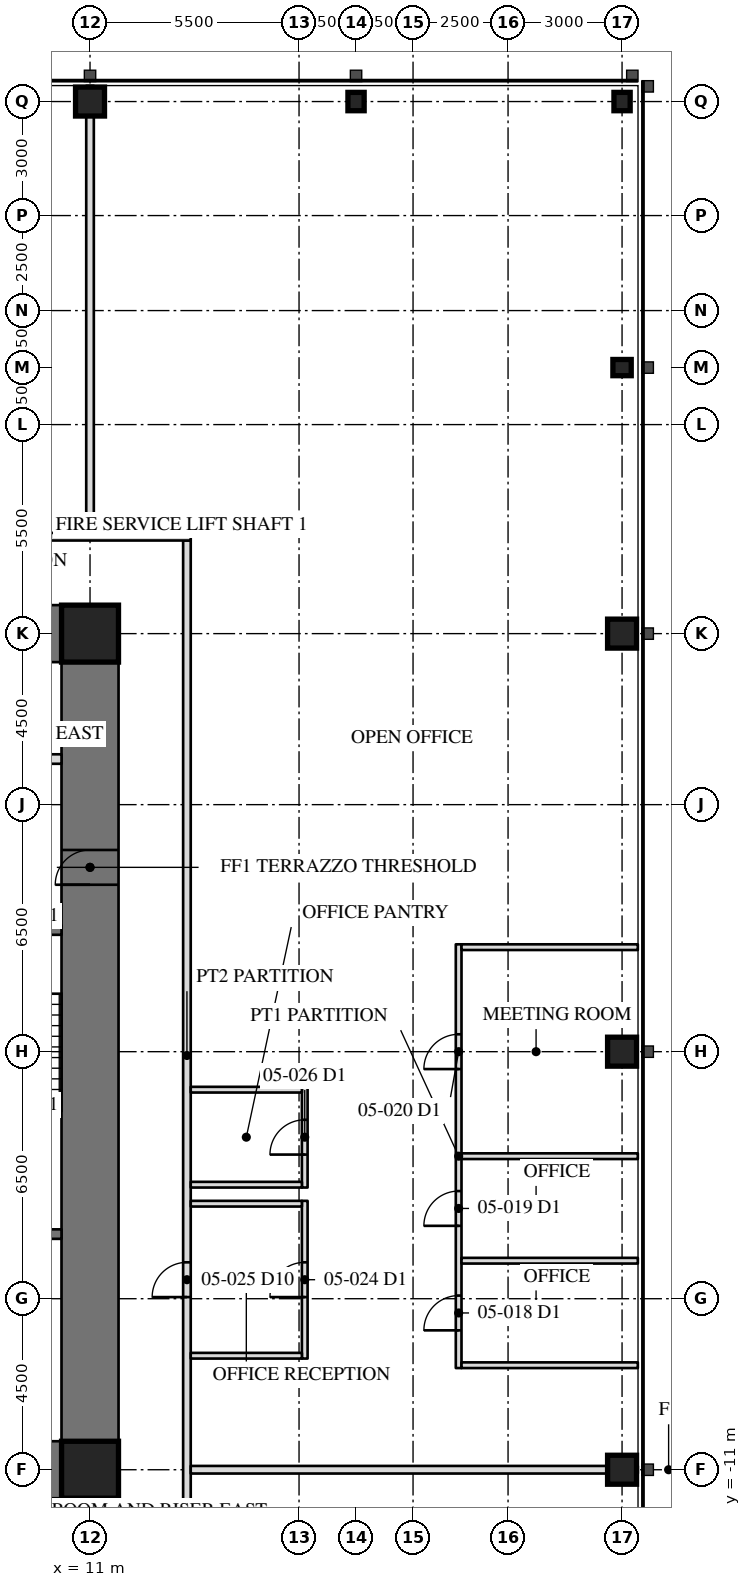
"""IFC4 building model, lengths in metres.
Left out: names, types, materials, properties, quantities, classifications, styles, units other than length and angle.
Written with IfcOpenShell. Run it as: python <this file> out.ifc"""

import sys

from ifc_helpers import new_model, si_unit, direction, frame, frame_2d, origin, origin_2d, place, context, subcontext, project, spatial, rectangle, hollow_rectangle, i_section, extrude, element, fill, save


model = new_model("IFC4")
c1 = context("Model", 3, precision=1e-05, world=origin(), true_north=direction((0.0, 1.0)))
c2 = subcontext(c1, "Body", "Model", "MODEL_VIEW")
j1 = project(units=[si_unit("LENGTHUNIT", "METRE"), si_unit("PLANEANGLEUNIT", "RADIAN")], contexts=[c1])
p1 = place(None, origin())
s1 = spatial("IfcSite", under=j1, at=p1, CompositionType="ELEMENT")
p2 = place(p1, origin())
s2 = spatial("IfcBuilding", under=s1, at=p2, CompositionType="ELEMENT")
p3 = place(p2, frame((0.0, 0.0, 24.2)))
s3 = spatial("IfcBuildingStorey", under=s2, at=p3, CompositionType="ELEMENT", Elevation=24.2)
for number, where, z_axis, x_axis in (
    (1, (25.0, -11.0, 0.0), (0.0, 0.0, 1.0), (0.0, 1.0, 0.0)),
    (2, (25.0, 0.0, 0.0), (0.0, 0.0, 1.0), (0.0, 1.0, 0.0)),
    (3, (25.0, 11.0, 0.0), (0.0, 0.0, 1.0), (0.0, 1.0, 0.0)),
):
    element("IfcColumn", number, at=place(p3, frame(where, z_axis=z_axis, x_axis=x_axis)), inside=s3, PredefinedType="COLUMN", context=c2, shape_type="SweptSolid", body=[
        extrude(hollow_rectangle(XDim=0.762, YDim=0.762, WallThickness=0.127, at=origin_2d()), origin(), (0.0, 0.0, 1.0), 4.1),
    ])
for number, where, z_axis, x_axis in (
    (4, (25.0, 18.0, 0.0), (0.0, 0.0, 1.0), (0.0, 1.0, 0.0)),
    (5, (25.0, 25.0, 0.0), (0.0, 0.0, 1.0), (1.0, 0.0, 0.0)),
    (6, (18.0, 25.0, 0.0), (0.0, 0.0, 1.0), (1.0, 0.0, 0.0)),
):
    element("IfcColumn", number, at=place(p3, frame(where, z_axis=z_axis, x_axis=x_axis)), inside=s3, PredefinedType="COLUMN", context=c2, shape_type="SweptSolid", body=[
        extrude(i_section(OverallWidth=0.427, OverallDepth=0.483, WebThickness=0.051, FlangeThickness=0.082, at=origin_2d()), origin(), (0.0, 0.0, 1.0), 4.1),
    ])
p4 = place(p3, frame((11.0, 25.0, 0.0), z_axis=(0.0, 0.0, 1.0), x_axis=(1.0, 0.0, 0.0)))
e7 = element("IfcColumn", 7, at=p4, inside=s3, PredefinedType="COLUMN", context=c2, shape_type="SweptSolid", body=[
    extrude(hollow_rectangle(XDim=0.762, YDim=0.762, WallThickness=0.127, at=origin_2d()), origin(), (0.0, 0.0, 1.0), 4.1),
])
p5 = place(p3, frame((11.0, -11.0, 0.0), z_axis=(0.0, 0.0, 1.0), x_axis=(0.0, 1.0, 0.0)))
e8 = element("IfcWall", 8, at=p5, inside=s3, PredefinedType="SHEAR", context=c2, shape_type="SweptSolid", body=[
    extrude(rectangle(XDim=22.0, YDim=1.5, at=frame_2d((11.0, 0.0))), origin(), (0.0, 0.0, 1.0), 4.1),
])
p6 = place(p5, frame((15.393, 0.0, 0.0)))
e9 = element("IfcOpeningElement", 9, at=p6, cuts=e8, PredefinedType="OPENING", context=c2, shape_type="SweptSolid", body=[
    extrude(rectangle(XDim=0.915, YDim=2.134, at=frame_2d((0.458, 1.067))), frame((0.0, 0.76, 0.0), z_axis=(0.0, -1.0, 0.0), x_axis=(1.0, 0.0, 0.0)), (0.0, 0.0, 1.0), 1.52),
])
for number, where, z_axis, x_axis in (
    (10, (11.0, 11.0, 0.0), (0.0, 0.0, 1.0), (-1.0, 0.0, 0.0)),
    (11, (6.5, -11.0, 0.0), (0.0, 0.0, 1.0), (1.0, 0.0, 0.0)),
):
    element("IfcWall", number, at=place(p3, frame(where, z_axis=z_axis, x_axis=x_axis)), inside=s3, PredefinedType="SHEAR", context=c2, shape_type="SweptSolid", body=[
        extrude(rectangle(XDim=4.5, YDim=1.5, at=frame_2d((2.25, 0.0))), origin(), (0.0, 0.0, 1.0), 4.1),
    ])
for number, where, z_axis, x_axis in (
    (12, (11.0, 11.0, 0.0), (0.0, 0.0, 1.0), (1.0, 0.0, 0.0)),
    (13, (11.0, -11.0, 0.0), (0.0, 0.0, 1.0), (1.0, 0.0, 0.0)),
):
    element("IfcColumn", number, at=place(p3, frame(where, z_axis=z_axis, x_axis=x_axis)), inside=s3, PredefinedType="COLUMN", context=c2, shape_type="SweptSolid", body=[
        extrude(hollow_rectangle(XDim=1.499, YDim=1.499, WallThickness=0.102, at=origin_2d()), origin(), (0.0, 0.0, 1.0), 4.1),
    ])
p7 = place(p3, frame((6.95, -4.8, 0.0), z_axis=(0.0, 0.0, 1.0), x_axis=(1.0, 0.0, 0.0)))
e14 = element("IfcWall", 14, at=p7, inside=s3, PredefinedType="SOLIDWALL", context=c2, shape_type="SweptSolid", body=[
    extrude(rectangle(XDim=3.3, YDim=0.25, at=frame_2d((1.65, 0.0))), origin(), (0.0, 0.0, 1.0), 3.91),
])
p8 = place(p3, frame((6.95, 3.2, 0.0), z_axis=(0.0, 0.0, 1.0), x_axis=(1.0, 0.0, 0.0)))
e15 = element("IfcWall", 15, at=p8, inside=s3, PredefinedType="SOLIDWALL", context=c2, shape_type="SweptSolid", body=[
    extrude(rectangle(XDim=3.3, YDim=0.25, at=frame_2d((1.65, 0.0))), origin(), (0.0, 0.0, 1.0), 3.91),
])
p9 = place(p8, frame((1.116, 0.0, 0.0)))
e16 = element("IfcOpeningElement", 16, at=p9, cuts=e15, PredefinedType="OPENING", context=c2, shape_type="SweptSolid", body=[
    extrude(rectangle(XDim=1.067, YDim=2.134, at=frame_2d((0.533, 1.067))), frame((0.0, 0.135, 0.0), z_axis=(0.0, -1.0, 0.0), x_axis=(1.0, 0.0, 0.0)), (0.0, 0.0, 1.0), 0.27),
])
p10 = place(p3, frame((6.95, 7.7, 0.0), z_axis=(0.0, 0.0, 1.0), x_axis=(1.0, 0.0, 0.0)))
e17 = element("IfcWall", 17, at=p10, inside=s3, PredefinedType="PARTITIONING", context=c2, shape_type="SweptSolid", body=[
    extrude(rectangle(XDim=3.3, YDim=0.25, at=frame_2d((1.65, 0.0))), origin(), (0.0, 0.0, 1.0), 3.91),
])
p11 = place(p10, frame((0.45, 0.0, 0.0)))
e18 = element("IfcOpeningElement", 18, at=p11, cuts=e17, PredefinedType="OPENING", context=c2, shape_type="SweptSolid", body=[
    extrude(rectangle(XDim=1.219, YDim=2.134, at=frame_2d((0.609, 1.067))), frame((0.0, 0.135, 0.0), z_axis=(0.0, -1.0, 0.0), x_axis=(1.0, 0.0, 0.0)), (0.0, 0.0, 1.0), 0.27),
])
p12 = place(p3, frame((13.55, -13.65, 0.0), z_axis=(0.0, 0.0, 1.0), x_axis=(0.0, 1.0, 0.0)))
e19 = element("IfcWall", 19, at=p12, inside=s3, PredefinedType="PARTITIONING", context=c2, shape_type="SweptSolid", body=[
    extrude(rectangle(XDim=27.1, YDim=0.2, at=frame_2d((13.55, 0.0))), origin(), (0.0, 0.0, 1.0), 3.91),
])
p13 = place(p12, frame((7.192, 0.0, 0.0)))
e20 = element("IfcOpeningElement", 20, at=p13, cuts=e19, PredefinedType="OPENING", context=c2, shape_type="SweptSolid", body=[
    extrude(rectangle(XDim=0.915, YDim=2.134, at=frame_2d((0.458, 1.067))), frame((0.0, 0.11, 0.0), z_axis=(0.0, -1.0, 0.0), x_axis=(1.0, 0.0, 0.0)), (0.0, 0.0, 1.0), 0.22),
])
p14 = place(p3, frame((13.65, 13.55, 0.0), z_axis=(0.0, 0.0, 1.0), x_axis=(-1.0, 0.0, 0.0)))
e21 = element("IfcWall", 21, at=p14, inside=s3, PredefinedType="PARTITIONING", context=c2, shape_type="SweptSolid", body=[
    extrude(rectangle(XDim=27.1, YDim=0.2, at=frame_2d((13.55, 0.0))), origin(), (0.0, 0.0, 1.0), 3.91),
])
p15 = place(p14, frame((9.192, 0.0, 0.0)))
e22 = element("IfcOpeningElement", 22, at=p15, cuts=e21, PredefinedType="OPENING", context=c2, shape_type="SweptSolid", body=[
    extrude(rectangle(XDim=0.915, YDim=2.134, at=frame_2d((0.458, 1.067))), frame((0.0, 0.11, 0.0), z_axis=(0.0, -1.0, 0.0), x_axis=(1.0, 0.0, 0.0)), (0.0, 0.0, 1.0), 0.22),
])
for number, where, z_axis, x_axis in (
    (23, (11.0, 13.65, 0.0), (0.0, 0.0, 1.0), (0.0, 1.0, 0.0)),
    (24, (13.65, -11.0, 0.0), (0.0, 0.0, 1.0), (1.0, 0.0, 0.0)),
):
    element("IfcWall", number, at=place(p3, frame(where, z_axis=z_axis, x_axis=x_axis)), inside=s3, PredefinedType="PARTITIONING", context=c2, shape_type="SweptSolid", body=[
        extrude(rectangle(XDim=11.765, YDim=0.2, at=frame_2d((5.883, 0.0))), origin(), (0.0, 0.0, 1.0), 3.13),
    ])
p16 = place(p3, frame((20.7, -8.325, 0.0), z_axis=(0.0, 0.0, 1.0), x_axis=(0.0, 1.0, 0.0)))
e25 = element("IfcWall", 25, at=p16, inside=s3, PredefinedType="PARTITIONING", context=c2, shape_type="SweptSolid", body=[
    extrude(rectangle(XDim=11.15, YDim=0.15, at=frame_2d((5.575, 0.0))), origin(), (0.0, 0.0, 1.0), 3.91),
])
p17 = place(p16, frame((0.992, 0.0, 0.0)))
e26 = element("IfcOpeningElement", 26, at=p17, cuts=e25, PredefinedType="OPENING", context=c2, shape_type="SweptSolid", body=[
    extrude(rectangle(XDim=0.915, YDim=2.134, at=frame_2d((0.458, 1.067))), frame((0.0, 0.085, 0.0), z_axis=(0.0, -1.0, 0.0), x_axis=(1.0, 0.0, 0.0)), (0.0, 0.0, 1.0), 0.17),
])
p18 = place(p16, frame((3.742, 0.0, 0.0)))
e27 = element("IfcOpeningElement", 27, at=p18, cuts=e25, PredefinedType="OPENING", context=c2, shape_type="SweptSolid", body=[
    extrude(rectangle(XDim=0.915, YDim=2.134, at=frame_2d((0.458, 1.067))), frame((0.0, 0.085, 0.0), z_axis=(0.0, -1.0, 0.0), x_axis=(1.0, 0.0, 0.0)), (0.0, 0.0, 1.0), 0.17),
])
p19 = place(p16, frame((7.867, 0.0, 0.0)))
e28 = element("IfcOpeningElement", 28, at=p19, cuts=e25, PredefinedType="OPENING", context=c2, shape_type="SweptSolid", body=[
    extrude(rectangle(XDim=0.915, YDim=2.134, at=frame_2d((0.458, 1.067))), frame((0.0, 0.085, 0.0), z_axis=(0.0, -1.0, 0.0), x_axis=(1.0, 0.0, 0.0)), (0.0, 0.0, 1.0), 0.17),
])
for number, where, z_axis, x_axis in (
    (29, (20.775, -8.25, 0.0), (0.0, 0.0, 1.0), (1.0, 0.0, 0.0)),
    (30, (20.775, -5.5, 0.0), (0.0, 0.0, 1.0), (1.0, 0.0, 0.0)),
    (31, (20.775, -2.75, 0.0), (0.0, 0.0, 1.0), (1.0, 0.0, 0.0)),
    (32, (20.775, 2.75, 0.0), (0.0, 0.0, 1.0), (1.0, 0.0, 0.0)),
):
    element("IfcWall", number, at=place(p3, frame(where, z_axis=z_axis, x_axis=x_axis)), inside=s3, PredefinedType="PARTITIONING", context=c2, shape_type="SweptSolid", body=[
        extrude(rectangle(XDim=4.64, YDim=0.15, at=frame_2d((2.32, 0.0))), origin(), (0.0, 0.0, 1.0), 3.91),
    ])
p20 = place(p3, frame((16.65, -8.075, 0.0), z_axis=(0.0, 0.0, 1.0), x_axis=(0.0, 1.0, 0.0)))
e33 = element("IfcWall", 33, at=p20, inside=s3, PredefinedType="PARTITIONING", context=c2, shape_type="SweptSolid", body=[
    extrude(rectangle(XDim=4.15, YDim=0.15, at=frame_2d((2.075, 0.0))), origin(), (0.0, 0.0, 1.0), 3.91),
])
p21 = place(p20, frame((1.617, 0.0, 0.0)))
e34 = element("IfcOpeningElement", 34, at=p21, cuts=e33, PredefinedType="OPENING", context=c2, shape_type="SweptSolid", body=[
    extrude(rectangle(XDim=0.915, YDim=2.134, at=frame_2d((0.458, 1.067))), frame((0.0, 0.085, 0.0), z_axis=(0.0, -1.0, 0.0), x_axis=(1.0, 0.0, 0.0)), (0.0, 0.0, 1.0), 0.17),
])
for number, where, z_axis, x_axis in (
    (35, (16.575, -8.0, 0.0), (0.0, 0.0, 1.0), (-1.0, 0.0, 0.0)),
    (36, (16.575, -4.0, 0.0), (0.0, 0.0, 1.0), (-1.0, 0.0, 0.0)),
):
    element("IfcWall", number, at=place(p3, frame(where, z_axis=z_axis, x_axis=x_axis)), inside=s3, PredefinedType="PARTITIONING", context=c2, shape_type="SweptSolid", body=[
        extrude(rectangle(XDim=2.925, YDim=0.15, at=frame_2d((1.462, 0.0))), origin(), (0.0, 0.0, 1.0), 3.91),
    ])
p22 = place(p3, frame((16.65, -3.575, 0.0), z_axis=(0.0, 0.0, 1.0), x_axis=(0.0, 1.0, 0.0)))
e37 = element("IfcWall", 37, at=p22, inside=s3, PredefinedType="PARTITIONING", context=c2, shape_type="SweptSolid", body=[
    extrude(rectangle(XDim=2.65, YDim=0.15, at=frame_2d((1.325, 0.0))), origin(), (0.0, 0.0, 1.0), 3.91),
])
p23 = place(p22, frame((0.867, 0.0, 0.0)))
e38 = element("IfcOpeningElement", 38, at=p23, cuts=e37, PredefinedType="OPENING", context=c2, shape_type="SweptSolid", body=[
    extrude(rectangle(XDim=0.915, YDim=2.134, at=frame_2d((0.458, 1.067))), frame((0.0, 0.085, 0.0), z_axis=(0.0, -1.0, 0.0), x_axis=(1.0, 0.0, 0.0)), (0.0, 0.0, 1.0), 0.17),
])
for number, where, z_axis, x_axis in (
    (39, (16.575, -3.5, 0.0), (0.0, 0.0, 1.0), (-1.0, 0.0, 0.0)),
    (40, (16.575, -1.0, 0.0), (0.0, 0.0, 1.0), (-1.0, 0.0, 0.0)),
):
    element("IfcWall", number, at=place(p3, frame(where, z_axis=z_axis, x_axis=x_axis)), inside=s3, PredefinedType="PARTITIONING", context=c2, shape_type="SweptSolid", body=[
        extrude(rectangle(XDim=2.925, YDim=0.15, at=frame_2d((1.462, 0.0))), origin(), (0.0, 0.0, 1.0), 3.91),
    ])
p24 = place(p6, origin())
e41 = element("IfcDoor", 41, at=p24, inside=s3, OperationType="SINGLE_SWING_RIGHT", PredefinedType="DOOR", context=c2, shape_type="SweptSolid", body=[
    extrude(rectangle(XDim=0.915, YDim=2.134, at=frame_2d((0.458, 1.067))), frame((0.0, -0.675, 0.0), z_axis=(0.0, -1.0, 0.0), x_axis=(1.0, 0.0, 0.0)), (0.0, 0.0, 1.0), 0.05),
])
fill(e9, e41)
p25 = place(p17, origin())
e42 = element("IfcDoor", 42, at=p25, inside=s3, OperationType="SINGLE_SWING_LEFT", PredefinedType="DOOR", context=c2, shape_type="SweptSolid", body=[
    extrude(rectangle(XDim=0.915, YDim=2.134, at=frame_2d((0.458, 1.067))), frame((0.0, 0.025, 0.0), z_axis=(0.0, -1.0, 0.0), x_axis=(1.0, 0.0, 0.0)), (0.0, 0.0, 1.0), 0.05),
])
fill(e26, e42)
p26 = place(p18, origin())
e43 = element("IfcDoor", 43, at=p26, inside=s3, OperationType="SINGLE_SWING_LEFT", PredefinedType="DOOR", context=c2, shape_type="SweptSolid", body=[
    extrude(rectangle(XDim=0.915, YDim=2.134, at=frame_2d((0.458, 1.067))), frame((0.0, 0.025, 0.0), z_axis=(0.0, -1.0, 0.0), x_axis=(1.0, 0.0, 0.0)), (0.0, 0.0, 1.0), 0.05),
])
fill(e27, e43)
p27 = place(p19, origin())
e44 = element("IfcDoor", 44, at=p27, inside=s3, OperationType="SINGLE_SWING_LEFT", PredefinedType="DOOR", context=c2, shape_type="SweptSolid", body=[
    extrude(rectangle(XDim=0.915, YDim=2.134, at=frame_2d((0.458, 1.067))), frame((0.0, 0.025, 0.0), z_axis=(0.0, -1.0, 0.0), x_axis=(1.0, 0.0, 0.0)), (0.0, 0.0, 1.0), 0.05),
])
fill(e28, e44)
p28 = place(p21, origin())
e45 = element("IfcDoor", 45, at=p28, inside=s3, OperationType="SINGLE_SWING_LEFT", PredefinedType="DOOR", context=c2, shape_type="SweptSolid", body=[
    extrude(rectangle(XDim=0.915, YDim=2.134, at=frame_2d((0.458, 1.067))), frame((0.0, 0.025, 0.0), z_axis=(0.0, -1.0, 0.0), x_axis=(1.0, 0.0, 0.0)), (0.0, 0.0, 1.0), 0.05),
])
fill(e34, e45)
p29 = place(p13, origin())
e46 = element("IfcDoor", 46, at=p29, inside=s3, OperationType="SINGLE_SWING_LEFT", PredefinedType="DOOR", context=c2, shape_type="SweptSolid", body=[
    extrude(rectangle(XDim=0.915, YDim=2.134, at=frame_2d((0.458, 1.067))), frame((0.0, 0.025, 0.0), z_axis=(0.0, -1.0, 0.0), x_axis=(1.0, 0.0, 0.0)), (0.0, 0.0, 1.0), 0.05),
])
fill(e20, e46)
p30 = place(p23, origin())
e47 = element("IfcDoor", 47, at=p30, inside=s3, OperationType="SINGLE_SWING_LEFT", PredefinedType="DOOR", context=c2, shape_type="SweptSolid", body=[
    extrude(rectangle(XDim=0.915, YDim=2.134, at=frame_2d((0.458, 1.067))), frame((0.0, 0.025, 0.0), z_axis=(0.0, -1.0, 0.0), x_axis=(1.0, 0.0, 0.0)), (0.0, 0.0, 1.0), 0.05),
])
fill(e38, e47)
save(model, sys.argv[1])
